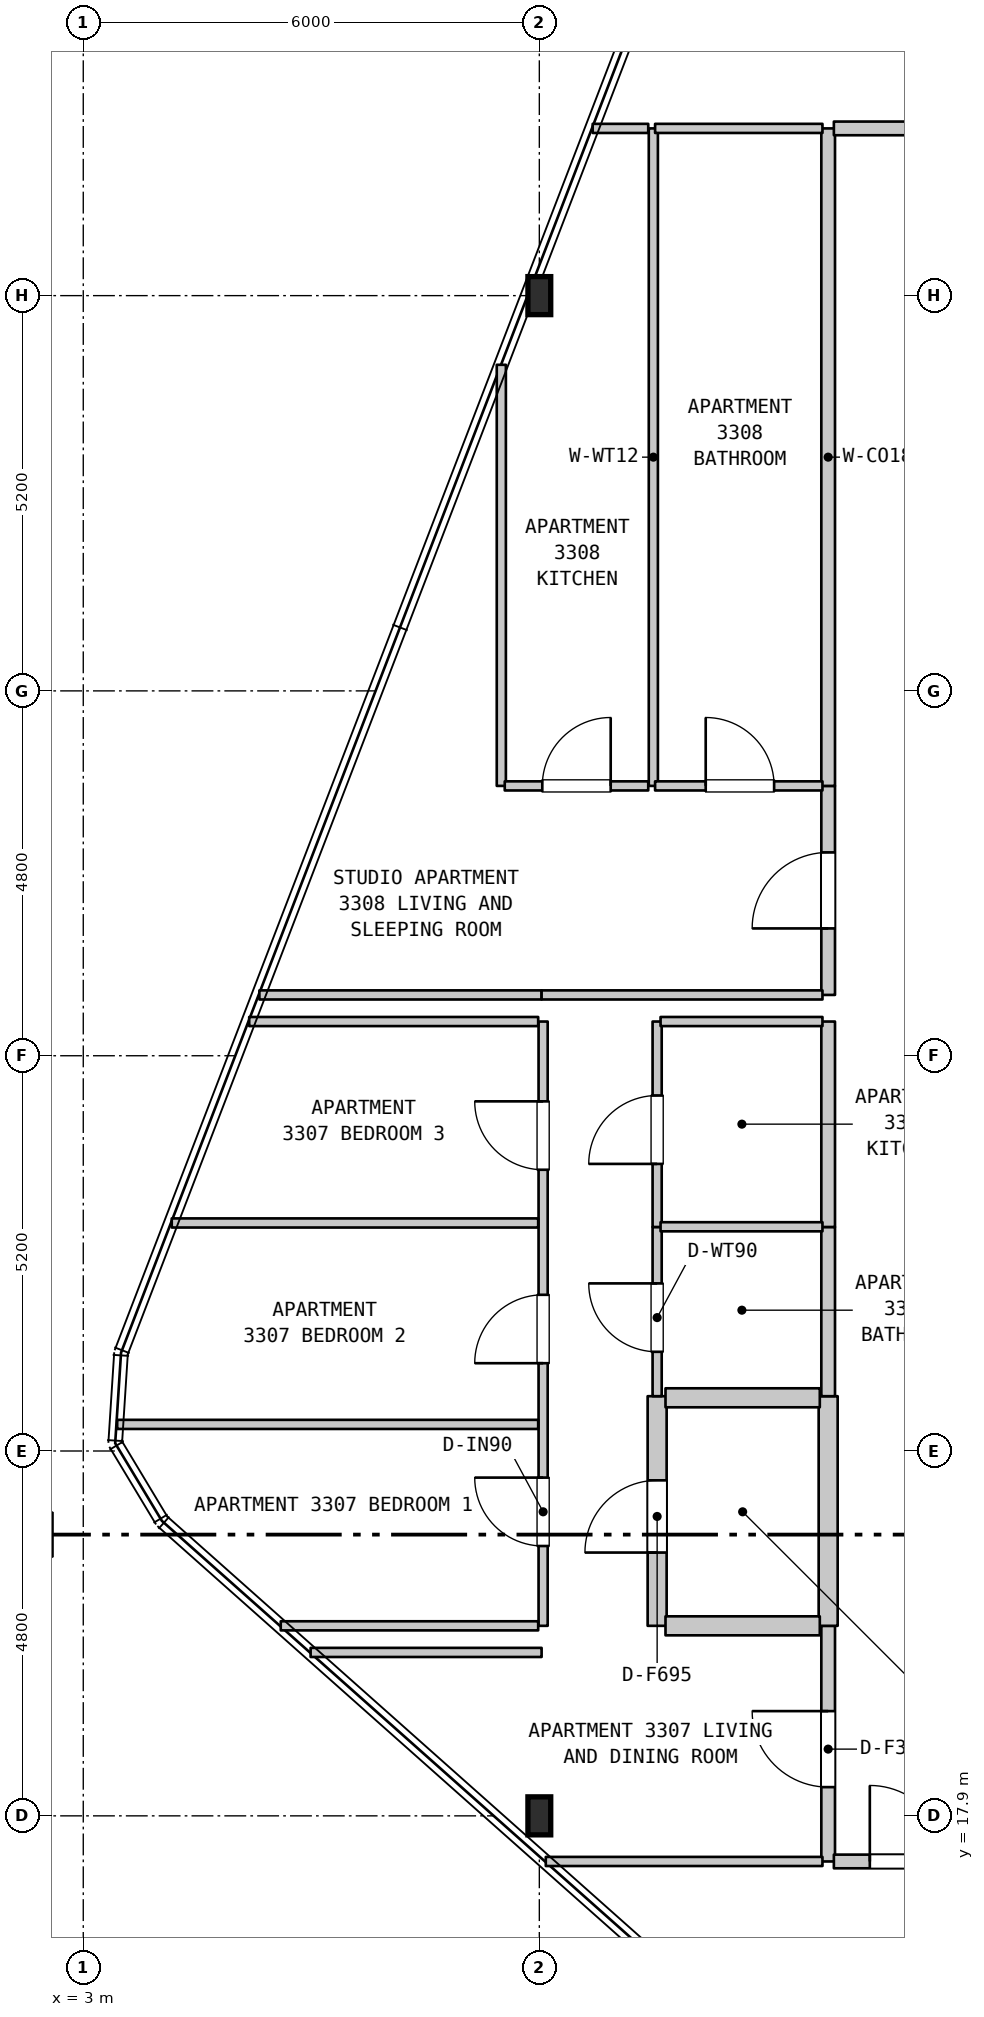
"""IFC4 building model, lengths in metres.
Left out: names, types, materials, properties, quantities, classifications, styles, units other than length and angle.
Written with IfcOpenShell. Run it as: python <this file> out.ifc"""

import sys

from ifc_helpers import new_model, si_unit, direction, frame, frame_2d, origin, origin_2d, place, context, subcontext, project, spatial, rectangle, i_section, extrude, element, fill, save


model = new_model("IFC4")
c1 = context("Model", 3, precision=1e-05, world=origin(), true_north=direction((0.0, 1.0)))
c2 = subcontext(c1, "Body", "Model", "MODEL_VIEW")
j1 = project(units=[si_unit("LENGTHUNIT", "METRE"), si_unit("PLANEANGLEUNIT", "RADIAN")], contexts=[c1])
p1 = place(None, origin())
s1 = spatial("IfcSite", under=j1, at=p1, CompositionType="ELEMENT")
p2 = place(p1, origin())
s2 = spatial("IfcBuilding", under=s1, at=p2, CompositionType="ELEMENT")
p3 = place(p2, frame((0.0, 0.0, 137.2)))
s3 = spatial("IfcBuildingStorey", under=s2, at=p3, CompositionType="ELEMENT", Elevation=137.2)
for number, where, z_axis, x_axis in (
    (1, (9.0, 17.9, 0.0), (0.0, 0.0, 1.0), (1.0, 0.0, 0.0)),
    (2, (9.0, 37.9, 0.0), (0.0, 0.0, 1.0), (1.0, 0.0, 0.0)),
):
    element("IfcColumn", number, at=place(p3, frame(where, z_axis=z_axis, x_axis=x_axis)), inside=s3, PredefinedType="COLUMN", context=c2, shape_type="SweptSolid", body=[
        extrude(i_section(OverallWidth=0.3, OverallDepth=0.5, WebThickness=0.014, FlangeThickness=0.028, FilletRadius=0.027, at=origin_2d()), origin(), (0.0, 0.0, 1.0), 3.7),
    ])
p4 = place(p3, frame((8.5, 31.45, 0.0), z_axis=(0.0, 0.0, 1.0), x_axis=(0.0, 1.0, 0.0)))
e3 = element("IfcWall", 3, at=p4, inside=s3, PredefinedType="PARTITIONING", context=c2, shape_type="SweptSolid", body=[
    extrude(rectangle(XDim=5.54, YDim=0.12, at=frame_2d((2.77, 0.0))), origin(), (0.0, 0.0, 1.0), 3.385),
])
p5 = place(p3, frame((9.05, 20.4, 0.0), z_axis=(0.0, 0.0, 1.0), x_axis=(0.0, 1.0, 0.0)))
e4 = element("IfcWall", 4, at=p5, inside=s3, PredefinedType="PARTITIONING", context=c2, shape_type="SweptSolid", body=[
    extrude(rectangle(XDim=7.95, YDim=0.12, at=frame_2d((3.975, 0.0))), origin(), (0.0, 0.0, 1.0), 2.785),
])
p6 = place(p5, frame((1.05, 0.0, 0.0)))
e5 = element("IfcOpeningElement", 5, at=p6, cuts=e4, PredefinedType="OPENING", context=c2, shape_type="SweptSolid", body=[
    extrude(rectangle(XDim=0.9, YDim=2.15, at=frame_2d((0.45, 1.075))), frame((0.0, 0.07, 0.0), z_axis=(0.0, -1.0, 0.0), x_axis=(1.0, 0.0, 0.0)), (0.0, 0.0, 1.0), 0.14),
])
p7 = place(p5, frame((3.455, 0.0, 0.0)))
e6 = element("IfcOpeningElement", 6, at=p7, cuts=e4, PredefinedType="OPENING", context=c2, shape_type="SweptSolid", body=[
    extrude(rectangle(XDim=0.9, YDim=2.15, at=frame_2d((0.45, 1.075))), frame((0.0, 0.07, 0.0), z_axis=(0.0, -1.0, 0.0), x_axis=(1.0, 0.0, 0.0)), (0.0, 0.0, 1.0), 0.14),
])
p8 = place(p5, frame((6.0, 0.0, 0.0)))
e7 = element("IfcOpeningElement", 7, at=p8, cuts=e4, PredefinedType="OPENING", context=c2, shape_type="SweptSolid", body=[
    extrude(rectangle(XDim=0.9, YDim=2.15, at=frame_2d((0.45, 1.075))), frame((0.0, 0.07, 0.0), z_axis=(0.0, -1.0, 0.0), x_axis=(1.0, 0.0, 0.0)), (0.0, 0.0, 1.0), 0.14),
])
p9 = place(p3, frame((10.5, 31.45, 0.0), z_axis=(0.0, 0.0, 1.0), x_axis=(0.0, 1.0, 0.0)))
e8 = element("IfcWall", 8, at=p9, inside=s3, PredefinedType="PARTITIONING", context=c2, shape_type="SweptSolid", body=[
    extrude(rectangle(XDim=8.65, YDim=0.12, at=frame_2d((4.325, 0.0))), origin(), (0.0, 0.0, 1.0), 3.385),
])
p10 = place(p3, frame((10.55, 20.4, 0.0), z_axis=(0.0, 0.0, 1.0), x_axis=(0.0, 1.0, 0.0)))
e9 = element("IfcWall", 9, at=p10, inside=s3, PredefinedType="STANDARD", context=c2, shape_type="SweptSolid", body=[
    extrude(rectangle(XDim=3.021, YDim=0.25, at=frame_2d((1.51, 0.0))), origin(), (0.0, 0.0, 1.0), 3.385),
])
p11 = place(p10, frame((0.964, 0.0, 0.0)))
e10 = element("IfcOpeningElement", 10, at=p11, cuts=e9, PredefinedType="OPENING", context=c2, shape_type="SweptSolid", body=[
    extrude(rectangle(XDim=0.95, YDim=2.15, at=frame_2d((0.475, 1.075))), frame((0.0, 0.135, 0.0), z_axis=(0.0, -1.0, 0.0), x_axis=(1.0, 0.0, 0.0)), (0.0, 0.0, 1.0), 0.27),
])
p12 = place(p3, frame((10.55, 23.421, 0.0), z_axis=(0.0, 0.0, 1.0), x_axis=(0.0, 1.0, 0.0)))
e11 = element("IfcWall", 11, at=p12, inside=s3, PredefinedType="PARTITIONING", context=c2, shape_type="SweptSolid", body=[
    extrude(rectangle(XDim=2.226, YDim=0.12, at=frame_2d((1.113, 0.0))), origin(), (0.0, 0.0, 1.0), 3.385),
])
p13 = place(p12, frame((0.584, 0.0, 0.0)))
e12 = element("IfcOpeningElement", 12, at=p13, cuts=e11, PredefinedType="OPENING", context=c2, shape_type="SweptSolid", body=[
    extrude(rectangle(XDim=0.9, YDim=2.1, at=frame_2d((0.45, 1.05))), frame((0.0, 0.07, 0.0), z_axis=(0.0, -1.0, 0.0), x_axis=(1.0, 0.0, 0.0)), (0.0, 0.0, 1.0), 0.14),
])
p14 = place(p3, frame((10.55, 25.647, 0.0), z_axis=(0.0, 0.0, 1.0), x_axis=(0.0, 1.0, 0.0)))
e13 = element("IfcWall", 13, at=p14, inside=s3, PredefinedType="PARTITIONING", context=c2, shape_type="SweptSolid", body=[
    extrude(rectangle(XDim=2.703, YDim=0.12, at=frame_2d((1.352, 0.0))), origin(), (0.0, 0.0, 1.0), 3.385),
])
p15 = place(p14, frame((0.83, 0.0, 0.0)))
e14 = element("IfcOpeningElement", 14, at=p15, cuts=e13, PredefinedType="OPENING", context=c2, shape_type="SweptSolid", body=[
    extrude(rectangle(XDim=0.9, YDim=2.15, at=frame_2d((0.45, 1.075))), frame((0.0, 0.07, 0.0), z_axis=(0.0, -1.0, 0.0), x_axis=(1.0, 0.0, 0.0)), (0.0, 0.0, 1.0), 0.14),
])
p16 = place(p3, frame((12.8, 17.3, 0.0), z_axis=(0.0, 0.0, 1.0), x_axis=(0.0, 1.0, 0.0)))
e15 = element("IfcWall", 15, at=p16, inside=s3, PredefinedType="STANDARD", context=c2, shape_type="SweptSolid", body=[
    extrude(rectangle(XDim=3.1, YDim=0.18, at=frame_2d((1.55, 0.0))), origin(), (0.0, 0.0, 1.0), 3.385),
])
p17 = place(p16, frame((0.978, 0.0, 0.0)))
e16 = element("IfcOpeningElement", 16, at=p17, cuts=e15, PredefinedType="OPENING", context=c2, shape_type="SweptSolid", body=[
    extrude(rectangle(XDim=1.0, YDim=2.15, at=frame_2d((0.5, 1.075))), frame((0.0, 0.1, 0.0), z_axis=(0.0, -1.0, 0.0), x_axis=(1.0, 0.0, 0.0)), (0.0, 0.0, 1.0), 0.2),
])
p18 = place(p3, frame((12.8, 20.4, 0.0), z_axis=(0.0, 0.0, 1.0), x_axis=(0.0, 1.0, 0.0)))
e17 = element("IfcWall", 17, at=p18, inside=s3, PredefinedType="STANDARD", context=c2, shape_type="SweptSolid", body=[
    extrude(rectangle(XDim=3.021, YDim=0.25, at=frame_2d((1.51, 0.0))), origin(), (0.0, 0.0, 1.0), 3.385),
])
p19 = place(p3, frame((12.8, 23.421, 0.0), z_axis=(0.0, 0.0, 1.0), x_axis=(0.0, 1.0, 0.0)))
e18 = element("IfcWall", 18, at=p19, inside=s3, PredefinedType="STANDARD", context=c2, shape_type="SweptSolid", body=[
    extrude(rectangle(XDim=2.226, YDim=0.18, at=frame_2d((1.113, 0.0))), origin(), (0.0, 0.0, 1.0), 3.385),
])
p20 = place(p3, frame((12.8, 25.647, 0.0), z_axis=(0.0, 0.0, 1.0), x_axis=(0.0, 1.0, 0.0)))
e19 = element("IfcWall", 19, at=p20, inside=s3, PredefinedType="STANDARD", context=c2, shape_type="SweptSolid", body=[
    extrude(rectangle(XDim=2.703, YDim=0.18, at=frame_2d((1.352, 0.0))), origin(), (0.0, 0.0, 1.0), 3.385),
])
p21 = place(p3, frame((12.8, 28.7, 0.0), z_axis=(0.0, 0.0, 1.0), x_axis=(0.0, 1.0, 0.0)))
e20 = element("IfcWall", 20, at=p21, inside=s3, PredefinedType="STANDARD", context=c2, shape_type="SweptSolid", body=[
    extrude(rectangle(XDim=2.75, YDim=0.18, at=frame_2d((1.375, 0.0))), origin(), (0.0, 0.0, 1.0), 3.385),
])
p22 = place(p21, frame((0.875, 0.0, 0.0)))
e21 = element("IfcOpeningElement", 21, at=p22, cuts=e20, PredefinedType="OPENING", context=c2, shape_type="SweptSolid", body=[
    extrude(rectangle(XDim=1.0, YDim=2.15, at=frame_2d((0.5, 1.075))), frame((0.0, 0.1, 0.0), z_axis=(0.0, -1.0, 0.0), x_axis=(1.0, 0.0, 0.0)), (0.0, 0.0, 1.0), 0.2),
])
p23 = place(p3, frame((12.8, 31.45, 0.0), z_axis=(0.0, 0.0, 1.0), x_axis=(0.0, 1.0, 0.0)))
e22 = element("IfcWall", 22, at=p23, inside=s3, PredefinedType="STANDARD", context=c2, shape_type="SweptSolid", body=[
    extrude(rectangle(XDim=8.65, YDim=0.18, at=frame_2d((4.325, 0.0))), origin(), (0.0, 0.0, 1.0), 3.385),
])
p24 = place(p3, frame((9.085, 17.3, 0.0), z_axis=(0.0, 0.0, 1.0), x_axis=(1.0, 0.0, 0.0)))
e23 = element("IfcWall", 23, at=p24, inside=s3, PredefinedType="PARTITIONING", context=c2, shape_type="SweptSolid", body=[
    extrude(rectangle(XDim=3.64, YDim=0.12, at=frame_2d((1.82, 0.0))), origin(), (0.0, 0.0, 1.0), 3.385),
])
p25 = place(p3, frame((12.875, 17.3, 0.0), z_axis=(0.0, 0.0, 1.0), x_axis=(1.0, 0.0, 0.0)))
e24 = element("IfcWall", 24, at=p25, inside=s3, PredefinedType="STANDARD", context=c2, shape_type="SweptSolid", body=[
    extrude(rectangle(XDim=3.58, YDim=0.18, at=frame_2d((1.79, 0.0))), origin(), (0.0, 0.0, 1.0), 3.385),
])
p26 = place(p25, frame((0.473, 0.0, 0.0)))
e25 = element("IfcOpeningElement", 25, at=p26, cuts=e24, PredefinedType="OPENING", context=c2, shape_type="SweptSolid", body=[
    extrude(rectangle(XDim=1.0, YDim=2.15, at=frame_2d((0.5, 1.075))), frame((0.0, 0.1, 0.0), z_axis=(0.0, -1.0, 0.0), x_axis=(1.0, 0.0, 0.0)), (0.0, 0.0, 1.0), 0.2),
])
p27 = place(p3, frame((5.991, 20.05, 0.0), z_axis=(0.0, 0.0, 1.0), x_axis=(1.0, 0.0, 0.0)))
e26 = element("IfcWall", 26, at=p27, inside=s3, PredefinedType="PARTITIONING", context=c2, shape_type="SweptSolid", body=[
    extrude(rectangle(XDim=3.039, YDim=0.12, at=frame_2d((1.52, 0.0))), origin(), (0.0, 0.0, 1.0), 3.385),
])
p28 = place(p3, frame((5.598, 20.4, 0.0), z_axis=(0.0, 0.0, 1.0), x_axis=(1.0, 0.0, 0.0)))
e27 = element("IfcWall", 27, at=p28, inside=s3, PredefinedType="PARTITIONING", context=c2, shape_type="SweptSolid", body=[
    extrude(rectangle(XDim=3.387, YDim=0.12, at=frame_2d((1.694, 0.0))), origin(), (0.0, 0.0, 1.0), 3.385),
])
p29 = place(p3, frame((10.66, 20.4, 0.0), z_axis=(0.0, 0.0, 1.0), x_axis=(1.0, 0.0, 0.0)))
e28 = element("IfcWall", 28, at=p29, inside=s3, PredefinedType="STANDARD", context=c2, shape_type="SweptSolid", body=[
    extrude(rectangle(XDim=2.03, YDim=0.25, at=frame_2d((1.015, 0.0))), origin(), (0.0, 0.0, 1.0), 3.385),
])
p30 = place(p3, frame((3.446, 23.05, 0.0), z_axis=(0.0, 0.0, 1.0), x_axis=(1.0, 0.0, 0.0)))
e29 = element("IfcWall", 29, at=p30, inside=s3, PredefinedType="PARTITIONING", context=c2, shape_type="SweptSolid", body=[
    extrude(rectangle(XDim=5.539, YDim=0.12, at=frame_2d((2.77, 0.0))), origin(), (0.0, 0.0, 1.0), 3.385),
])
p31 = place(p3, frame((10.66, 23.4, 0.0), z_axis=(0.0, 0.0, 1.0), x_axis=(1.0, 0.0, 0.0)))
e30 = element("IfcWall", 30, at=p31, inside=s3, PredefinedType="STANDARD", context=c2, shape_type="SweptSolid", body=[
    extrude(rectangle(XDim=2.03, YDim=0.25, at=frame_2d((1.015, 0.0))), origin(), (0.0, 0.0, 1.0), 3.385),
])
p32 = place(p3, frame((10.595, 25.65, 0.0), z_axis=(0.0, 0.0, 1.0), x_axis=(1.0, 0.0, 0.0)))
e31 = element("IfcWall", 31, at=p32, inside=s3, PredefinedType="PARTITIONING", context=c2, shape_type="SweptSolid", body=[
    extrude(rectangle(XDim=2.13, YDim=0.12, at=frame_2d((1.065, 0.0))), origin(), (0.0, 0.0, 1.0), 3.385),
])
p33 = place(p3, frame((4.164, 25.7, 0.0), z_axis=(0.0, 0.0, 1.0), x_axis=(1.0, 0.0, 0.0)))
e32 = element("IfcWall", 32, at=p33, inside=s3, PredefinedType="PARTITIONING", context=c2, shape_type="SweptSolid", body=[
    extrude(rectangle(XDim=4.821, YDim=0.12, at=frame_2d((2.411, 0.0))), origin(), (0.0, 0.0, 1.0), 3.385),
])
p34 = place(p3, frame((5.183, 28.35, 0.0), z_axis=(0.0, 0.0, 1.0), x_axis=(1.0, 0.0, 0.0)))
e33 = element("IfcWall", 33, at=p34, inside=s3, PredefinedType="PARTITIONING", context=c2, shape_type="SweptSolid", body=[
    extrude(rectangle(XDim=3.802, YDim=0.12, at=frame_2d((1.901, 0.0))), origin(), (0.0, 0.0, 1.0), 3.385),
])
p35 = place(p3, frame((10.595, 28.35, 0.0), z_axis=(0.0, 0.0, 1.0), x_axis=(1.0, 0.0, 0.0)))
e34 = element("IfcWall", 34, at=p35, inside=s3, PredefinedType="PARTITIONING", context=c2, shape_type="SweptSolid", body=[
    extrude(rectangle(XDim=2.13, YDim=0.12, at=frame_2d((1.065, 0.0))), origin(), (0.0, 0.0, 1.0), 3.385),
])
p36 = place(p3, frame((5.317, 28.7, 0.0), z_axis=(0.0, 0.0, 1.0), x_axis=(1.0, 0.0, 0.0)))
e35 = element("IfcWall", 35, at=p36, inside=s3, PredefinedType="PARTITIONING", context=c2, shape_type="SweptSolid", body=[
    extrude(rectangle(XDim=3.713, YDim=0.12, at=frame_2d((1.856, 0.0))), origin(), (0.0, 0.0, 1.0), 3.385),
])
p37 = place(p3, frame((9.03, 28.7, 0.0), z_axis=(0.0, 0.0, 1.0), x_axis=(1.0, 0.0, 0.0)))
e36 = element("IfcWall", 36, at=p37, inside=s3, PredefinedType="PARTITIONING", context=c2, shape_type="SweptSolid", body=[
    extrude(rectangle(XDim=3.695, YDim=0.12, at=frame_2d((1.848, 0.0))), origin(), (0.0, 0.0, 1.0), 3.385),
])
p38 = place(p3, frame((8.545, 31.45, 0.0), z_axis=(0.0, 0.0, 1.0), x_axis=(1.0, 0.0, 0.0)))
e37 = element("IfcWall", 37, at=p38, inside=s3, PredefinedType="PARTITIONING", context=c2, shape_type="SweptSolid", body=[
    extrude(rectangle(XDim=1.888, YDim=0.12, at=frame_2d((0.944, 0.0))), origin(), (0.0, 0.0, 1.0), 3.385),
])
p39 = place(p38, frame((0.494, 0.0, 0.0)))
e38 = element("IfcOpeningElement", 38, at=p39, cuts=e37, PredefinedType="OPENING", context=c2, shape_type="SweptSolid", body=[
    extrude(rectangle(XDim=0.9, YDim=2.15, at=frame_2d((0.45, 1.075))), frame((0.0, 0.07, 0.0), z_axis=(0.0, -1.0, 0.0), x_axis=(1.0, 0.0, 0.0)), (0.0, 0.0, 1.0), 0.14),
])
p40 = place(p3, frame((10.523, 31.45, 0.0), z_axis=(0.0, 0.0, 1.0), x_axis=(1.0, 0.0, 0.0)))
e39 = element("IfcWall", 39, at=p40, inside=s3, PredefinedType="PARTITIONING", context=c2, shape_type="SweptSolid", body=[
    extrude(rectangle(XDim=2.202, YDim=0.12, at=frame_2d((1.101, 0.0))), origin(), (0.0, 0.0, 1.0), 3.385),
])
p41 = place(p40, frame((0.666, 0.0, 0.0)))
e40 = element("IfcOpeningElement", 40, at=p41, cuts=e39, PredefinedType="OPENING", context=c2, shape_type="SweptSolid", body=[
    extrude(rectangle(XDim=0.9, YDim=2.1, at=frame_2d((0.45, 1.05))), frame((0.0, 0.07, 0.0), z_axis=(0.0, -1.0, 0.0), x_axis=(1.0, 0.0, 0.0)), (0.0, 0.0, 1.0), 0.14),
])
p42 = place(p3, frame((9.702, 40.1, 0.0), z_axis=(0.0, 0.0, 1.0), x_axis=(1.0, 0.0, 0.0)))
e41 = element("IfcWall", 41, at=p42, inside=s3, PredefinedType="PARTITIONING", context=c2, shape_type="SweptSolid", body=[
    extrude(rectangle(XDim=0.731, YDim=0.12, at=frame_2d((0.366, 0.0))), origin(), (0.0, 0.0, 1.0), 3.385),
])
p43 = place(p3, frame((10.523, 40.1, 0.0), z_axis=(0.0, 0.0, 1.0), x_axis=(1.0, 0.0, 0.0)))
e42 = element("IfcWall", 42, at=p43, inside=s3, PredefinedType="PARTITIONING", context=c2, shape_type="SweptSolid", body=[
    extrude(rectangle(XDim=2.202, YDim=0.12, at=frame_2d((1.101, 0.0))), origin(), (0.0, 0.0, 1.0), 3.385),
])
p44 = place(p3, frame((12.875, 40.1, 0.0), z_axis=(0.0, 0.0, 1.0), x_axis=(1.0, 0.0, 0.0)))
e43 = element("IfcWall", 43, at=p44, inside=s3, PredefinedType="STANDARD", context=c2, shape_type="SweptSolid", body=[
    extrude(rectangle(XDim=2.125, YDim=0.18, at=frame_2d((1.062, 0.0))), origin(), (0.0, 0.0, 1.0), 3.385),
])
p45 = place(p6, origin())
e44 = element("IfcDoor", 44, at=p45, inside=s3, OperationType="SINGLE_SWING_RIGHT", PredefinedType="DOOR", context=c2, shape_type="SweptSolid", body=[
    extrude(rectangle(XDim=0.9, YDim=2.15, at=frame_2d((0.45, 1.075))), frame((0.0, 0.025, 0.0), z_axis=(0.0, -1.0, 0.0), x_axis=(1.0, 0.0, 0.0)), (0.0, 0.0, 1.0), 0.05),
])
fill(e5, e44)
p46 = place(p7, origin())
e45 = element("IfcDoor", 45, at=p46, inside=s3, OperationType="SINGLE_SWING_LEFT", PredefinedType="DOOR", context=c2, shape_type="SweptSolid", body=[
    extrude(rectangle(XDim=0.9, YDim=2.15, at=frame_2d((0.45, 1.075))), frame((0.0, 0.025, 0.0), z_axis=(0.0, -1.0, 0.0), x_axis=(1.0, 0.0, 0.0)), (0.0, 0.0, 1.0), 0.05),
])
fill(e6, e45)
p47 = place(p8, origin())
e46 = element("IfcDoor", 46, at=p47, inside=s3, OperationType="SINGLE_SWING_RIGHT", PredefinedType="DOOR", context=c2, shape_type="SweptSolid", body=[
    extrude(rectangle(XDim=0.9, YDim=2.15, at=frame_2d((0.45, 1.075))), frame((0.0, 0.025, 0.0), z_axis=(0.0, -1.0, 0.0), x_axis=(1.0, 0.0, 0.0)), (0.0, 0.0, 1.0), 0.05),
])
fill(e7, e46)
p48 = place(p11, origin())
e47 = element("IfcDoor", 47, at=p48, inside=s3, OperationType="SINGLE_SWING_LEFT", PredefinedType="DOOR", context=c2, shape_type="SweptSolid", body=[
    extrude(rectangle(XDim=0.95, YDim=2.15, at=frame_2d((0.475, 1.075))), frame((0.0, 0.025, 0.0), z_axis=(0.0, -1.0, 0.0), x_axis=(1.0, 0.0, 0.0)), (0.0, 0.0, 1.0), 0.05),
])
fill(e10, e47)
p49 = place(p13, origin())
e48 = element("IfcDoor", 48, at=p49, inside=s3, OperationType="SINGLE_SWING_RIGHT", PredefinedType="DOOR", context=c2, shape_type="SweptSolid", body=[
    extrude(rectangle(XDim=0.9, YDim=2.1, at=frame_2d((0.45, 1.05))), frame((0.0, 0.025, 0.0), z_axis=(0.0, -1.0, 0.0), x_axis=(1.0, 0.0, 0.0)), (0.0, 0.0, 1.0), 0.05),
])
fill(e12, e48)
p50 = place(p15, origin())
e49 = element("IfcDoor", 49, at=p50, inside=s3, OperationType="SINGLE_SWING_LEFT", PredefinedType="DOOR", context=c2, shape_type="SweptSolid", body=[
    extrude(rectangle(XDim=0.9, YDim=2.15, at=frame_2d((0.45, 1.075))), frame((0.0, 0.025, 0.0), z_axis=(0.0, -1.0, 0.0), x_axis=(1.0, 0.0, 0.0)), (0.0, 0.0, 1.0), 0.05),
])
fill(e14, e49)
p51 = place(p17, origin())
e50 = element("IfcDoor", 50, at=p51, inside=s3, OperationType="SINGLE_SWING_RIGHT", PredefinedType="DOOR", context=c2, shape_type="SweptSolid", body=[
    extrude(rectangle(XDim=1.0, YDim=2.15, at=frame_2d((0.5, 1.075))), frame((0.0, 0.025, 0.0), z_axis=(0.0, -1.0, 0.0), x_axis=(1.0, 0.0, 0.0)), (0.0, 0.0, 1.0), 0.05),
])
fill(e16, e50)
p52 = place(p22, origin())
e51 = element("IfcDoor", 51, at=p52, inside=s3, OperationType="SINGLE_SWING_LEFT", PredefinedType="DOOR", context=c2, shape_type="SweptSolid", body=[
    extrude(rectangle(XDim=1.0, YDim=2.15, at=frame_2d((0.5, 1.075))), frame((0.0, 0.025, 0.0), z_axis=(0.0, -1.0, 0.0), x_axis=(1.0, 0.0, 0.0)), (0.0, 0.0, 1.0), 0.05),
])
fill(e21, e51)
p53 = place(p26, origin())
e52 = element("IfcDoor", 52, at=p53, inside=s3, OperationType="SINGLE_SWING_LEFT", PredefinedType="DOOR", context=c2, shape_type="SweptSolid", body=[
    extrude(rectangle(XDim=1.0, YDim=2.15, at=frame_2d((0.5, 1.075))), frame((0.0, 0.025, 0.0), z_axis=(0.0, -1.0, 0.0), x_axis=(1.0, 0.0, 0.0)), (0.0, 0.0, 1.0), 0.05),
])
fill(e25, e52)
p54 = place(p39, origin())
e53 = element("IfcDoor", 53, at=p54, inside=s3, OperationType="SINGLE_SWING_RIGHT", PredefinedType="DOOR", context=c2, shape_type="SweptSolid", body=[
    extrude(rectangle(XDim=0.9, YDim=2.15, at=frame_2d((0.45, 1.075))), frame((0.0, 0.025, 0.0), z_axis=(0.0, -1.0, 0.0), x_axis=(1.0, 0.0, 0.0)), (0.0, 0.0, 1.0), 0.05),
])
fill(e38, e53)
p55 = place(p41, origin())
e54 = element("IfcDoor", 54, at=p55, inside=s3, OperationType="SINGLE_SWING_LEFT", PredefinedType="DOOR", context=c2, shape_type="SweptSolid", body=[
    extrude(rectangle(XDim=0.9, YDim=2.1, at=frame_2d((0.45, 1.05))), frame((0.0, 0.025, 0.0), z_axis=(0.0, -1.0, 0.0), x_axis=(1.0, 0.0, 0.0)), (0.0, 0.0, 1.0), 0.05),
])
fill(e40, e54)
save(model, sys.argv[1])
